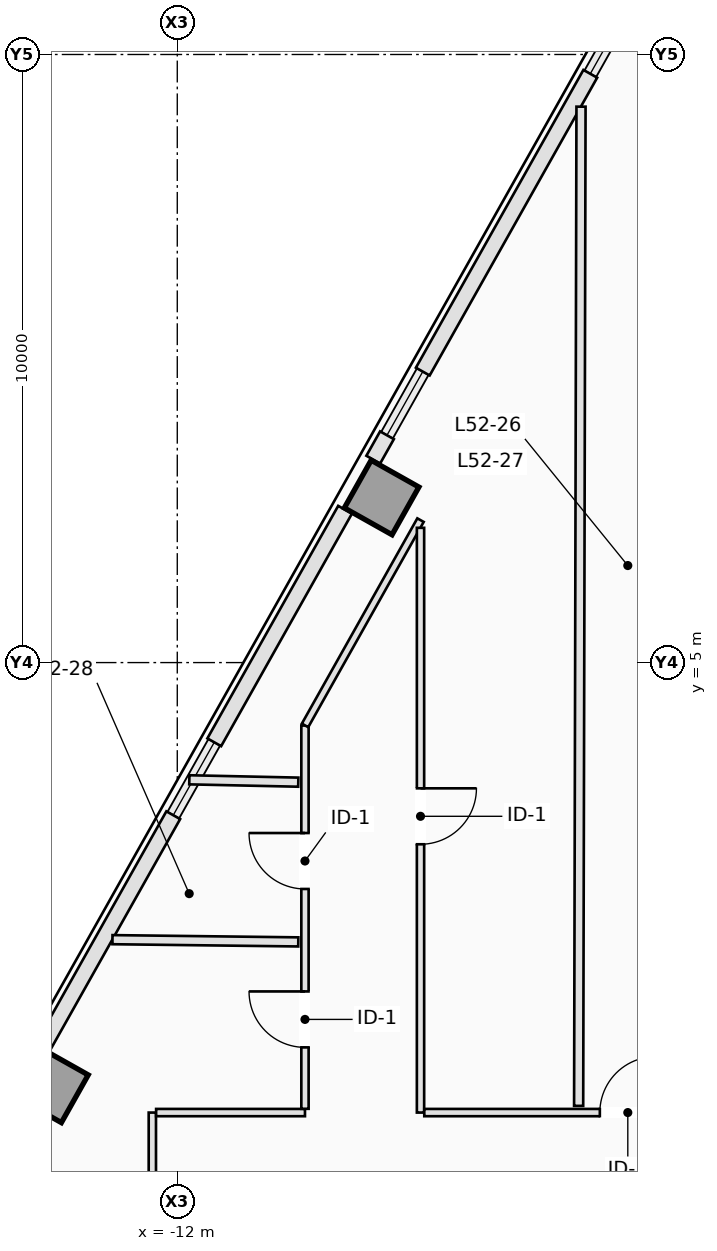
"""IFC4 building model, lengths in metres.
Left out: names, types, materials, properties, quantities, classifications, styles, units other than length and angle.
Written with IfcOpenShell. Run it as: python <this file> out.ifc"""

import sys

from ifc_helpers import new_model, si_unit, direction, frame, frame_2d, origin, origin_2d, place, context, subcontext, project, spatial, rectangle, extrude, element, fill, save


model = new_model("IFC4")
c1 = context("Model", 3, precision=1e-05, world=origin(), true_north=direction((0.0, 1.0)))
c2 = subcontext(c1, "Body", "Model", "MODEL_VIEW")
j1 = project(units=[si_unit("LENGTHUNIT", "METRE"), si_unit("PLANEANGLEUNIT", "RADIAN")], contexts=[c1])
p1 = place(None, origin())
s1 = spatial("IfcSite", under=j1, at=p1, CompositionType="ELEMENT")
p2 = place(p1, origin())
s2 = spatial("IfcBuilding", under=s1, at=p2, CompositionType="ELEMENT")
p3 = place(p2, frame((0.0, 0.0, 190.4)))
s3 = spatial("IfcBuildingStorey", under=s2, at=p3, CompositionType="ELEMENT", Elevation=190.4)
for number, where, z_axis, x_axis in (
    (1, (-8.64, 7.715, 0.0), (0.0, 0.0, 1.0), (-0.872, 0.49, 0.0)),
    (2, (-14.077, -1.952, 0.0), (0.0, 0.0, 1.0), (-0.872, 0.49, 0.0)),
):
    element("IfcColumn", number, at=place(p3, frame(where, z_axis=z_axis, x_axis=x_axis)), inside=s3, PredefinedType="COLUMN", context=c2, shape_type="SweptSolid", body=[
        extrude(rectangle(XDim=0.9, YDim=0.9, at=origin_2d()), origin(), (0.0, 0.0, 1.0), 3.5),
    ])
p4 = place(p3, frame((-8.777, 8.337, 0.0), z_axis=(0.0, 0.0, 1.0), x_axis=(0.490412424957, 0.871490478116, 0.0)))
e3 = element("IfcWall", 3, at=p4, inside=s3, PredefinedType="STANDARD", context=c2, shape_type="SweptSolid", body=[
    extrude(rectangle(XDim=0.46, YDim=0.26, at=frame_2d((0.23, 0.0))), origin(), (0.0, 0.0, 1.0), 3.25),
])
p5 = place(p3, frame((-7.962, 9.785, 0.0), z_axis=(0.0, 0.0, 1.0), x_axis=(0.490240608828, 0.871587141631, 0.0)))
e4 = element("IfcWall", 4, at=p5, inside=s3, PredefinedType="STANDARD", context=c2, shape_type="SweptSolid", body=[
    extrude(rectangle(XDim=5.618, YDim=0.26, at=frame_2d((2.809, 0.0))), origin(), (0.0, 0.0, 1.0), 3.25),
])
p6 = place(p3, frame((-14.217, -1.334, 0.0), z_axis=(0.0, 0.0, 1.0), x_axis=(0.490261239633, 0.871575537125, 0.0)))
e5 = element("IfcWall", 5, at=p6, inside=s3, PredefinedType="STANDARD", context=c2, shape_type="SweptSolid", body=[
    extrude(rectangle(XDim=4.388, YDim=0.26, at=frame_2d((2.194, 0.0))), origin(), (0.0, 0.0, 1.0), 3.25),
])
p7 = place(p3, frame((-11.392, 3.689, 0.0), z_axis=(0.0, 0.0, 1.0), x_axis=(0.490237464814, 0.871588910033, 0.0)))
e6 = element("IfcWall", 6, at=p7, inside=s3, PredefinedType="STANDARD", context=c2, shape_type="SweptSolid", body=[
    extrude(rectangle(XDim=4.388, YDim=0.26, at=frame_2d((2.194, 0.0))), origin(), (0.0, 0.0, 1.0), 3.25),
])
p8 = place(p3, frame((-12.41, -5.073, 0.0), z_axis=(0.0, 0.0, 1.0), x_axis=(0.0, 1.0, 0.0)))
e7 = element("IfcWall", 7, at=p8, inside=s3, PredefinedType="PARTITIONING", context=c2, shape_type="SweptSolid", body=[
    extrude(rectangle(XDim=2.673, YDim=0.12, at=frame_2d((1.336, 0.0))), origin(), (0.0, 0.0, 1.0), 3.25),
])
p9 = place(p3, frame((-12.348, -2.4, 0.0), z_axis=(0.0, 0.0, 1.0), x_axis=(1.0, 0.0, 0.0)))
e8 = element("IfcWall", 8, at=p9, inside=s3, PredefinedType="PARTITIONING", context=c2, shape_type="SweptSolid", body=[
    extrude(rectangle(XDim=2.448, YDim=0.12, at=frame_2d((1.224, 0.0))), origin(), (0.0, 0.0, 1.0), 3.25),
])
p10 = place(p3, frame((-9.9, -2.338, 0.0), z_axis=(0.0, 0.0, 1.0), x_axis=(0.0, 1.0, 0.0)))
e9 = element("IfcWall", 9, at=p10, inside=s3, PredefinedType="PARTITIONING", context=c2, shape_type="SweptSolid", body=[
    extrude(rectangle(XDim=6.303, YDim=0.12, at=frame_2d((3.151, 0.0))), origin(), (0.0, 0.0, 1.0), 3.25),
])
p11 = place(p10, frame((3.615, 0.0, 0.0)))
e10 = element("IfcOpeningElement", 10, at=p11, cuts=e9, PredefinedType="OPENING", context=c2, shape_type="SweptSolid", body=[
    extrude(rectangle(XDim=0.92, YDim=2.12, at=frame_2d((0.46, 1.06))), frame((0.0, 0.07, 0.0), z_axis=(0.0, -1.0, 0.0), x_axis=(1.0, 0.0, 0.0)), (0.0, 0.0, 1.0), 0.14),
])
p12 = place(p10, frame((1.01, 0.0, 0.0)))
e11 = element("IfcOpeningElement", 11, at=p12, cuts=e9, PredefinedType="OPENING", context=c2, shape_type="SweptSolid", body=[
    extrude(rectangle(XDim=0.92, YDim=2.12, at=frame_2d((0.46, 1.06))), frame((0.0, 0.07, 0.0), z_axis=(0.0, -1.0, 0.0), x_axis=(1.0, 0.0, 0.0)), (0.0, 0.0, 1.0), 0.14),
])
p13 = place(p3, frame((-9.899, 3.967, 0.0), z_axis=(0.0, 0.0, 1.0), x_axis=(0.490276203052, 0.871567120032, 0.0)))
e12 = element("IfcWall", 12, at=p13, inside=s3, PredefinedType="PARTITIONING", context=c2, shape_type="SweptSolid", body=[
    extrude(rectangle(XDim=3.873, YDim=0.12, at=frame_2d((1.937, 0.0))), origin(), (0.0, 0.0, 1.0), 3.25),
])
p14 = place(p3, frame((-8.0, 7.216, 0.0), z_axis=(0.0, 0.0, 1.0), x_axis=(0.0, -1.0, 0.0)))
e13 = element("IfcWall", 13, at=p14, inside=s3, PredefinedType="PARTITIONING", context=c2, shape_type="SweptSolid", body=[
    extrude(rectangle(XDim=9.616, YDim=0.12, at=frame_2d((4.808, 0.0))), origin(), (0.0, 0.0, 1.0), 3.25),
])
p15 = place(p14, frame((4.284, 0.0, 0.0)))
e14 = element("IfcOpeningElement", 14, at=p15, cuts=e13, PredefinedType="OPENING", context=c2, shape_type="SweptSolid", body=[
    extrude(rectangle(XDim=0.92, YDim=2.12, at=frame_2d((0.46, 1.06))), frame((0.0, 0.07, 0.0), z_axis=(0.0, -1.0, 0.0), x_axis=(1.0, 0.0, 0.0)), (0.0, 0.0, 1.0), 0.14),
])
p16 = place(p3, frame((-7.938, -2.4, 0.0), z_axis=(0.0, 0.0, 1.0), x_axis=(1.0, 0.0, 0.0)))
e15 = element("IfcWall", 15, at=p16, inside=s3, PredefinedType="PARTITIONING", context=c2, shape_type="SweptSolid", body=[
    extrude(rectangle(XDim=9.176, YDim=0.12, at=frame_2d((4.588, 0.0))), origin(), (0.0, 0.0, 1.0), 2.943),
])
p17 = place(p16, frame((4.464, 0.0, 0.0)))
e16 = element("IfcOpeningElement", 16, at=p17, cuts=e15, PredefinedType="OPENING", context=c2, shape_type="SweptSolid", body=[
    extrude(rectangle(XDim=0.92, YDim=2.12, at=frame_2d((0.46, 1.06))), frame((0.0, 0.07, 0.0), z_axis=(0.0, -1.0, 0.0), x_axis=(1.0, 0.0, 0.0)), (0.0, 0.0, 1.0), 0.14),
])
p18 = place(p16, frame((6.986, 0.0, 0.0)))
e17 = element("IfcOpeningElement", 17, at=p18, cuts=e15, PredefinedType="OPENING", context=c2, shape_type="SweptSolid", body=[
    extrude(rectangle(XDim=0.92, YDim=2.12, at=frame_2d((0.46, 1.06))), frame((0.0, 0.07, 0.0), z_axis=(0.0, -1.0, 0.0), x_axis=(1.0, 0.0, 0.0)), (0.0, 0.0, 1.0), 0.14),
])
p19 = place(p16, frame((2.887, 0.0, 0.0)))
e18 = element("IfcOpeningElement", 18, at=p19, cuts=e15, PredefinedType="OPENING", context=c2, shape_type="SweptSolid", body=[
    extrude(rectangle(XDim=0.92, YDim=2.12, at=frame_2d((0.46, 1.06))), frame((0.0, 0.07, 0.0), z_axis=(0.0, -1.0, 0.0), x_axis=(1.0, 0.0, 0.0)), (0.0, 0.0, 1.0), 0.14),
])
p20 = place(p3, frame((-5.4, -2.29, 0.0), z_axis=(0.0, 0.0, 1.0), x_axis=(0.00237719591, 0.999997174466, 0.0)))
e19 = element("IfcWall", 19, at=p20, inside=s3, PredefinedType="PARTITIONING", context=c2, shape_type="SweptSolid", body=[
    extrude(rectangle(XDim=16.432, YDim=0.15, at=frame_2d((8.216, 0.0))), origin(), (0.0, 0.0, 1.0), 3.25),
])
p21 = place(p3, frame((-10.01, 3.033, 0.0), z_axis=(0.0, 0.0, 1.0), x_axis=(-0.999765394805, 0.021659994246, 0.0)))
e20 = element("IfcWall", 20, at=p21, inside=s3, PredefinedType="PARTITIONING", context=c2, shape_type="SweptSolid", body=[
    extrude(rectangle(XDim=1.792, YDim=0.15, at=frame_2d((0.896, 0.0))), origin(), (0.0, 0.0, 1.0), 3.25),
])
p22 = place(p3, frame((-10.01, 0.406, 0.0), z_axis=(0.0, 0.0, 1.0), x_axis=(-0.999927242797, 0.0120627158, 0.0)))
e21 = element("IfcWall", 21, at=p22, inside=s3, PredefinedType="PARTITIONING", context=c2, shape_type="SweptSolid", body=[
    extrude(rectangle(XDim=3.056, YDim=0.15, at=frame_2d((1.528, 0.0))), origin(), (0.0, 0.0, 1.0), 3.25),
])
p23 = place(p19, origin())
e22 = element("IfcDoor", 22, at=p23, inside=s3, OperationType="SINGLE_SWING_RIGHT", PredefinedType="DOOR", context=c2, shape_type="SweptSolid", body=[
    extrude(rectangle(XDim=0.92, YDim=2.12, at=frame_2d((0.46, 1.06))), frame((0.0, 0.025, 0.0), z_axis=(0.0, -1.0, 0.0), x_axis=(1.0, 0.0, 0.0)), (0.0, 0.0, 1.0), 0.05),
])
fill(e18, e22)
p24 = place(p15, origin())
e23 = element("IfcDoor", 23, at=p24, inside=s3, OperationType="SINGLE_SWING_LEFT", PredefinedType="DOOR", context=c2, shape_type="SweptSolid", body=[
    extrude(rectangle(XDim=0.92, YDim=2.12, at=frame_2d((0.46, 1.06))), frame((0.0, 0.025, 0.0), z_axis=(0.0, -1.0, 0.0), x_axis=(1.0, 0.0, 0.0)), (0.0, 0.0, 1.0), 0.05),
])
fill(e14, e23)
p25 = place(p11, origin())
e24 = element("IfcDoor", 24, at=p25, inside=s3, OperationType="SINGLE_SWING_RIGHT", PredefinedType="DOOR", context=c2, shape_type="SweptSolid", body=[
    extrude(rectangle(XDim=0.92, YDim=2.12, at=frame_2d((0.46, 1.06))), frame((0.0, 0.025, 0.0), z_axis=(0.0, -1.0, 0.0), x_axis=(1.0, 0.0, 0.0)), (0.0, 0.0, 1.0), 0.05),
])
fill(e10, e24)
p26 = place(p12, origin())
e25 = element("IfcDoor", 25, at=p26, inside=s3, OperationType="SINGLE_SWING_RIGHT", PredefinedType="DOOR", context=c2, shape_type="SweptSolid", body=[
    extrude(rectangle(XDim=0.92, YDim=2.12, at=frame_2d((0.46, 1.06))), frame((0.0, 0.025, 0.0), z_axis=(0.0, -1.0, 0.0), x_axis=(1.0, 0.0, 0.0)), (0.0, 0.0, 1.0), 0.05),
])
fill(e11, e25)
save(model, sys.argv[1])
